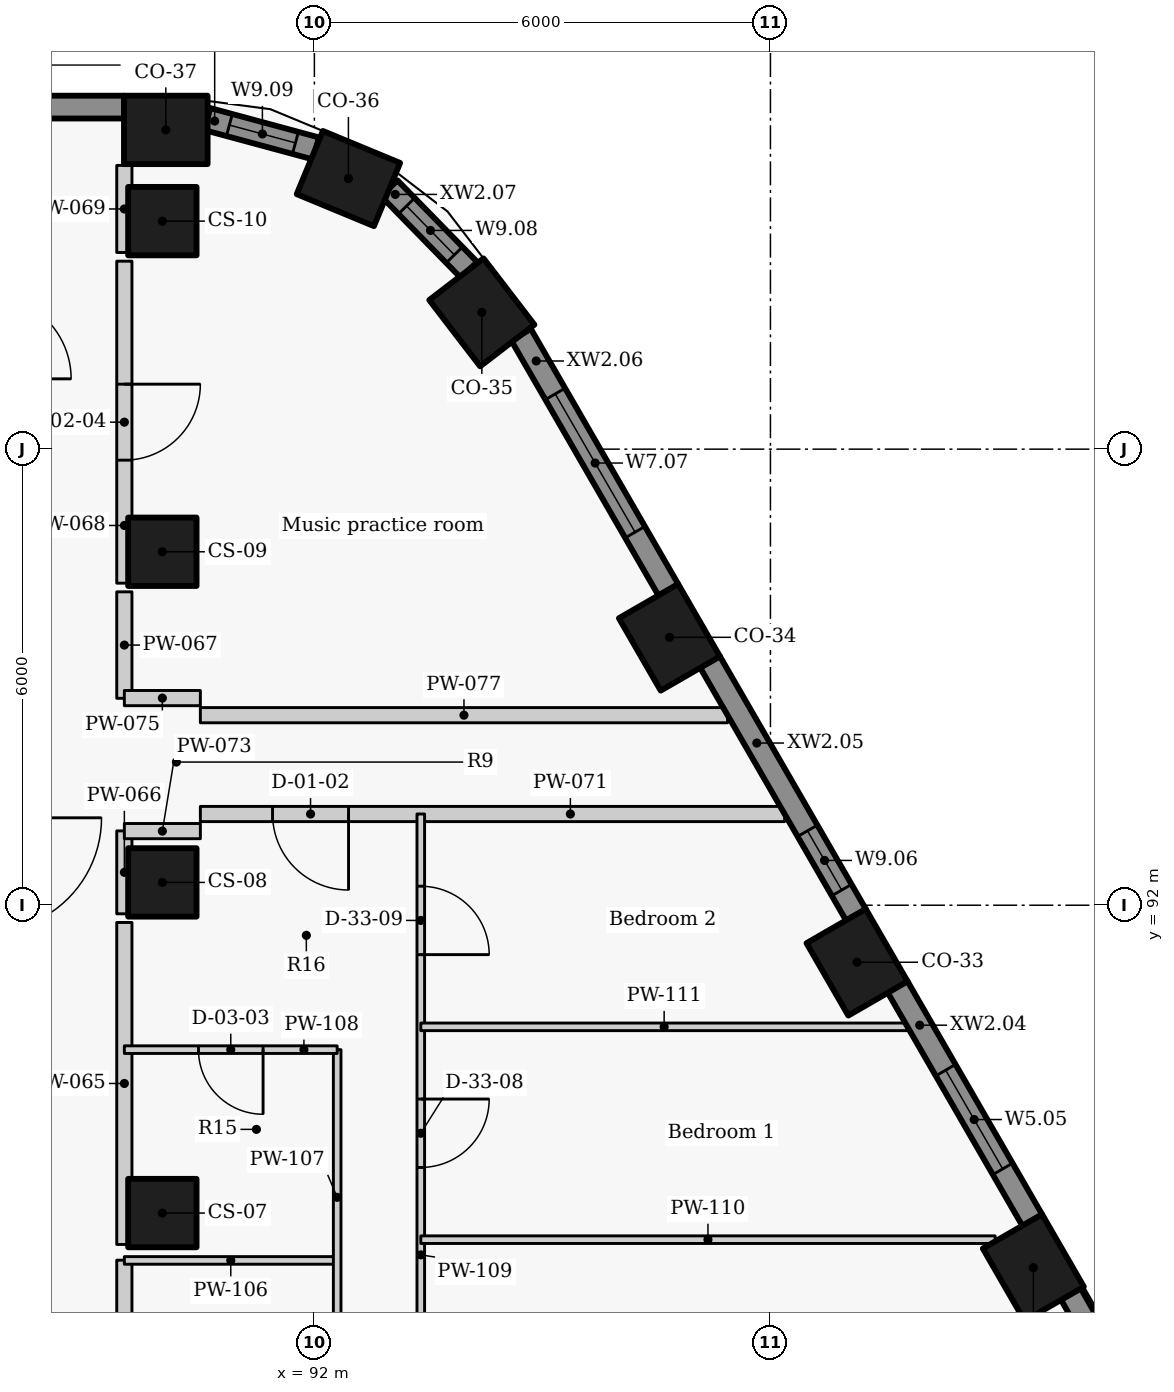
"""IFC4 building model, lengths in metres.
Left out: names, types, materials, properties, quantities, classifications, styles, units other than length and angle.
Written with IfcOpenShell. Run it as: python <this file> out.ifc"""

import sys

from ifc_helpers import new_model, si_unit, direction, frame, frame_2d, origin, origin_2d, place, context, subcontext, project, spatial, rectangle, extrude, element, fill, save


model = new_model("IFC4")
c1 = context("Model", 3, precision=1e-05, world=origin(), true_north=direction((0.0, 1.0)))
c2 = subcontext(c1, "Body", "Model", "MODEL_VIEW")
j1 = project(units=[si_unit("LENGTHUNIT", "METRE"), si_unit("PLANEANGLEUNIT", "RADIAN")], contexts=[c1])
p1 = place(None, origin())
s1 = spatial("IfcSite", under=j1, at=p1, CompositionType="ELEMENT")
p2 = place(p1, origin())
s2 = spatial("IfcBuilding", under=s1, at=p2, CompositionType="ELEMENT")
p3 = place(p2, frame((0.0, 0.0, 249.3)))
s3 = spatial("IfcBuildingStorey", under=s2, at=p3, CompositionType="ELEMENT", Elevation=249.3)
for number, where, z_axis, x_axis in (
    (1, (101.459, 87.232, 0.0), (0.0, 0.0, 1.0), (-0.5, 0.866, 0.0)),
    (2, (99.139, 91.25, 0.0), (0.0, 0.0, 1.0), (-0.5, 0.866, 0.0)),
    (3, (96.671, 95.525, 0.0), (0.0, 0.0, 1.0), (-0.5, 0.866, 0.0)),
    (4, (94.203, 99.8, 0.0), (0.0, 0.0, 1.0), (-0.609, 0.793, 0.0)),
    (5, (92.448, 101.56, 0.0), (0.0, 0.0, 1.0), (-0.924, 0.383, 0.0)),
    (6, (90.045, 102.2, 0.0), (0.0, 0.0, 1.0), (-1.0, 0.0, 0.0)),
):
    element("IfcColumn", number, at=place(p3, frame(where, z_axis=z_axis, x_axis=x_axis)), inside=s3, PredefinedType="COLUMN", context=c2, shape_type="SweptSolid", body=[
        extrude(rectangle(XDim=1.1, YDim=0.9, at=origin_2d()), origin(), (0.0, 0.0, 1.0), 3.3),
    ])
for number, where, z_axis, x_axis in (
    (7, (90.0, 87.95, 0.0), (0.0, 0.0, 1.0), (0.0, 1.0, 0.0)),
    (8, (90.0, 92.3, 0.0), (0.0, 0.0, 1.0), (0.0, 1.0, 0.0)),
    (9, (90.0, 96.65, 0.0), (0.0, 0.0, 1.0), (0.0, 1.0, 0.0)),
    (10, (90.0, 101.0, 0.0), (0.0, 0.0, 1.0), (0.0, 1.0, 0.0)),
):
    element("IfcColumn", number, at=place(p3, frame(where, z_axis=z_axis, x_axis=x_axis)), inside=s3, PredefinedType="COLUMN", context=c2, shape_type="SweptSolid", body=[
        extrude(rectangle(XDim=0.9, YDim=0.9, at=origin_2d()), origin(), (0.0, 0.0, 1.0), 3.3),
    ])
p4 = place(p3, frame((104.627, 82.154, 0.0), z_axis=(0.0, 0.0, 1.0), x_axis=(-0.492080931903, 0.870549456641, 0.0)))
e11 = element("IfcWall", 11, at=p4, inside=s3, PredefinedType="SOLIDWALL", context=c2, shape_type="SweptSolid", body=[
    extrude(rectangle(XDim=5.437, YDim=0.3, at=frame_2d((2.718, 0.0))), origin(), (0.0, 0.0, 1.0), 2.425),
])
p5 = place(p4, frame((0.934, 0.0, 0.9)))
e12 = element("IfcOpeningElement", 12, at=p5, cuts=e11, PredefinedType="OPENING", context=c2, shape_type="SweptSolid", body=[
    extrude(rectangle(XDim=0.9, YDim=1.1, at=frame_2d((0.45, 0.55))), frame((0.0, 0.16, 0.0), z_axis=(0.0, -1.0, 0.0), x_axis=(1.0, 0.0, 0.0)), (0.0, 0.0, 1.0), 0.32),
])
p6 = place(p4, frame((2.764, 0.0, 0.9)))
e13 = element("IfcOpeningElement", 13, at=p6, cuts=e11, PredefinedType="OPENING", context=c2, shape_type="SweptSolid", body=[
    extrude(rectangle(XDim=2.1, YDim=1.1, at=frame_2d((1.05, 0.55))), frame((0.0, 0.16, 0.0), z_axis=(0.0, -1.0, 0.0), x_axis=(1.0, 0.0, 0.0)), (0.0, 0.0, 1.0), 0.32),
])
p7 = place(p3, frame((101.446, 87.855, 0.0), z_axis=(0.0, 0.0, 1.0), x_axis=(-0.500010404316, 0.866019396766, 0.0)))
e14 = element("IfcWall", 14, at=p7, inside=s3, PredefinedType="SOLIDWALL", context=c2, shape_type="SweptSolid", body=[
    extrude(rectangle(XDim=3.547, YDim=0.3, at=frame_2d((1.774, 0.0))), origin(), (0.0, 0.0, 1.0), 2.425),
])
p8 = place(p7, frame((0.781, 0.0, 0.9)))
e15 = element("IfcOpeningElement", 15, at=p8, cuts=e14, PredefinedType="OPENING", context=c2, shape_type="SweptSolid", body=[
    extrude(rectangle(XDim=1.5, YDim=1.1, at=frame_2d((0.75, 0.55))), frame((0.0, 0.16, 0.0), z_axis=(0.0, -1.0, 0.0), x_axis=(1.0, 0.0, 0.0)), (0.0, 0.0, 1.0), 0.32),
])
p9 = place(p3, frame((99.126, 91.873, 0.0), z_axis=(0.0, 0.0, 1.0), x_axis=(-0.499984490703, 0.866034357896, 0.0)))
e16 = element("IfcWall", 16, at=p9, inside=s3, PredefinedType="SOLIDWALL", context=c2, shape_type="SweptSolid", body=[
    extrude(rectangle(XDim=3.844, YDim=0.3, at=frame_2d((1.922, 0.0))), origin(), (0.0, 0.0, 1.0), 2.425),
])
p10 = place(p9, frame((0.377, 0.0, 0.9)))
e17 = element("IfcOpeningElement", 17, at=p10, cuts=e16, PredefinedType="OPENING", context=c2, shape_type="SweptSolid", body=[
    extrude(rectangle(XDim=0.9, YDim=1.1, at=frame_2d((0.45, 0.55))), frame((0.0, 0.16, 0.0), z_axis=(0.0, -1.0, 0.0), x_axis=(1.0, 0.0, 0.0)), (0.0, 0.0, 1.0), 0.32),
])
p11 = place(p3, frame((96.658, 96.147, 0.0), z_axis=(0.0, 0.0, 1.0), x_axis=(-0.500011218404, 0.866018926739, 0.0)))
e18 = element("IfcWall", 18, at=p11, inside=s3, PredefinedType="SOLIDWALL", context=c2, shape_type="SweptSolid", body=[
    extrude(rectangle(XDim=3.879, YDim=0.3, at=frame_2d((1.939, 0.0))), origin(), (0.0, 0.0, 1.0), 2.425),
])
p12 = place(p11, frame((0.878, 0.0, 0.9)))
e19 = element("IfcOpeningElement", 19, at=p12, cuts=e18, PredefinedType="OPENING", context=c2, shape_type="SweptSolid", body=[
    extrude(rectangle(XDim=2.1, YDim=1.1, at=frame_2d((1.05, 0.55))), frame((0.0, 0.16, 0.0), z_axis=(0.0, -1.0, 0.0), x_axis=(1.0, 0.0, 0.0)), (0.0, 0.0, 1.0), 0.32),
])
p13 = place(p3, frame((94.034, 100.358, 0.0), z_axis=(0.0, 0.0, 1.0), x_axis=(-0.698675602211, 0.71543860874, 0.0)))
e20 = element("IfcWall", 20, at=p13, inside=s3, PredefinedType="SOLIDWALL", context=c2, shape_type="SweptSolid", body=[
    extrude(rectangle(XDim=1.5, YDim=0.3, at=frame_2d((0.75, 0.0))), origin(), (0.0, 0.0, 1.0), 2.425),
])
p14 = place(p13, frame((0.276, 0.0, 0.9)))
e21 = element("IfcOpeningElement", 21, at=p14, cuts=e20, PredefinedType="OPENING", context=c2, shape_type="SweptSolid", body=[
    extrude(rectangle(XDim=0.9, YDim=1.1, at=frame_2d((0.45, 0.55))), frame((0.0, 0.16, 0.0), z_axis=(0.0, -1.0, 0.0), x_axis=(1.0, 0.0, 0.0)), (0.0, 0.0, 1.0), 0.32),
])
p15 = place(p3, frame((92.021, 101.956, 0.0), z_axis=(0.0, 0.0, 1.0), x_axis=(-0.965392564919, 0.260801065181, 0.0)))
e22 = element("IfcWall", 22, at=p15, inside=s3, PredefinedType="SOLIDWALL", context=c2, shape_type="SweptSolid", body=[
    extrude(rectangle(XDim=1.481, YDim=0.3, at=frame_2d((0.74, 0.0))), origin(), (0.0, 0.0, 1.0), 2.425),
])
p16 = place(p15, frame((0.28, 0.0, 0.9)))
e23 = element("IfcOpeningElement", 23, at=p16, cuts=e22, PredefinedType="OPENING", context=c2, shape_type="SweptSolid", body=[
    extrude(rectangle(XDim=0.9, YDim=1.1, at=frame_2d((0.45, 0.55))), frame((0.0, 0.16, 0.0), z_axis=(0.0, -1.0, 0.0), x_axis=(1.0, 0.0, 0.0)), (0.0, 0.0, 1.0), 0.32),
])
p17 = place(p3, frame((89.499, 102.5, 0.0), z_axis=(0.0, 0.0, 1.0), x_axis=(-1.0, 0.0, 0.0)))
e24 = element("IfcWall", 24, at=p17, inside=s3, PredefinedType="SOLIDWALL", context=c2, shape_type="SweptSolid", body=[
    extrude(rectangle(XDim=19.033, YDim=0.3, at=frame_2d((9.517, 0.0))), origin(), (0.0, 0.0, 1.0), 2.425),
])
p18 = place(p3, frame((89.5, 82.237, 0.0), z_axis=(0.0, 0.0, 1.0), x_axis=(0.0, 1.0, 0.0)))
e25 = element("IfcWall", 25, at=p18, inside=s3, PredefinedType="PARTITIONING", context=c2, shape_type="SweptSolid", body=[
    extrude(rectangle(XDim=5.093, YDim=0.2, at=frame_2d((2.547, 0.0))), origin(), (0.0, 0.0, 1.0), 3.025),
])
p19 = place(p3, frame((89.5, 87.537, 0.0), z_axis=(0.0, 0.0, 1.0), x_axis=(0.0, 1.0, 0.0)))
e26 = element("IfcWall", 26, at=p19, inside=s3, PredefinedType="PARTITIONING", context=c2, shape_type="SweptSolid", body=[
    extrude(rectangle(XDim=4.236, YDim=0.2, at=frame_2d((2.118, 0.0))), origin(), (0.0, 0.0, 1.0), 3.025),
])
p20 = place(p3, frame((89.5, 91.887, 0.0), z_axis=(0.0, 0.0, 1.0), x_axis=(0.0, 1.0, 0.0)))
e27 = element("IfcWall", 27, at=p20, inside=s3, PredefinedType="PARTITIONING", context=c2, shape_type="SweptSolid", body=[
    extrude(rectangle(XDim=1.091, YDim=0.2, at=frame_2d((0.545, 0.0))), origin(), (0.0, 0.0, 1.0), 3.025),
])
p21 = place(p3, frame((89.5, 94.722, 0.0), z_axis=(0.0, 0.0, 1.0), x_axis=(0.0, 1.0, 0.0)))
e28 = element("IfcWall", 28, at=p21, inside=s3, PredefinedType="PARTITIONING", context=c2, shape_type="SweptSolid", body=[
    extrude(rectangle(XDim=1.401, YDim=0.2, at=frame_2d((0.701, 0.0))), origin(), (0.0, 0.0, 1.0), 3.025),
])
p22 = place(p3, frame((89.5, 100.473, 0.0), z_axis=(0.0, 0.0, 1.0), x_axis=(0.0, -1.0, 0.0)))
e29 = element("IfcWall", 29, at=p22, inside=s3, PredefinedType="PARTITIONING", context=c2, shape_type="SweptSolid", body=[
    extrude(rectangle(XDim=4.236, YDim=0.2, at=frame_2d((2.118, 0.0))), origin(), (0.0, 0.0, 1.0), 3.025),
])
p23 = place(p22, frame((1.618, 0.0, 0.0)))
e30 = element("IfcOpeningElement", 30, at=p23, cuts=e29, PredefinedType="OPENING", context=c2, shape_type="SweptSolid", body=[
    extrude(rectangle(XDim=1.0, YDim=2.1, at=frame_2d((0.5, 1.05))), frame((0.0, 0.11, 0.0), z_axis=(0.0, -1.0, 0.0), x_axis=(1.0, 0.0, 0.0)), (0.0, 0.0, 1.0), 0.22),
])
p24 = place(p3, frame((89.5, 100.587, 0.0), z_axis=(0.0, 0.0, 1.0), x_axis=(0.0, 1.0, 0.0)))
e31 = element("IfcWall", 31, at=p24, inside=s3, PredefinedType="PARTITIONING", context=c2, shape_type="SweptSolid", body=[
    extrude(rectangle(XDim=1.146, YDim=0.2, at=frame_2d((0.573, 0.0))), origin(), (0.0, 0.0, 1.0), 3.025),
])
p25 = place(p3, frame((98.187, 93.2, 0.0), z_axis=(0.0, 0.0, 1.0), x_axis=(-1.0, 0.0, 0.0)))
e32 = element("IfcWall", 32, at=p25, inside=s3, PredefinedType="PARTITIONING", context=c2, shape_type="SweptSolid", body=[
    extrude(rectangle(XDim=7.687, YDim=0.2, at=frame_2d((3.843, 0.0))), origin(), (0.0, 0.0, 1.0), 2.405),
])
p26 = place(p25, frame((5.737, 0.0, 0.0)))
e33 = element("IfcOpeningElement", 33, at=p26, cuts=e32, PredefinedType="OPENING", context=c2, shape_type="SweptSolid", body=[
    extrude(rectangle(XDim=1.0, YDim=2.1, at=frame_2d((0.5, 1.05))), frame((0.0, 0.11, 0.0), z_axis=(0.0, -1.0, 0.0), x_axis=(1.0, 0.0, 0.0)), (0.0, 0.0, 1.0), 0.22),
])
for number, where, z_axis, x_axis in (
    (34, (89.5, 92.975, 0.0), (0.0, 0.0, 1.0), (1.0, 0.0, 0.0)),
    (35, (89.5, 94.725, 0.0), (0.0, 0.0, 1.0), (1.0, 0.0, 0.0)),
):
    element("IfcWall", number, at=place(p3, frame(where, z_axis=z_axis, x_axis=x_axis)), inside=s3, PredefinedType="PARTITIONING", context=c2, shape_type="SweptSolid", body=[
        extrude(rectangle(XDim=1.0, YDim=0.2, at=frame_2d((0.5, 0.0))), origin(), (0.0, 0.0, 1.0), 2.505),
    ])
p27 = place(p3, frame((90.5, 94.5, 0.0), z_axis=(0.0, 0.0, 1.0), x_axis=(1.0, 0.0, 0.0)))
e36 = element("IfcWall", 36, at=p27, inside=s3, PredefinedType="PARTITIONING", context=c2, shape_type="SweptSolid", body=[
    extrude(rectangle(XDim=6.936, YDim=0.2, at=frame_2d((3.468, 0.0))), origin(), (0.0, 0.0, 1.0), 2.405),
])
p28 = place(p3, frame((89.5, 87.327, 0.0), z_axis=(0.0, 0.0, 1.0), x_axis=(1.0, 0.0, 0.0)))
e37 = element("IfcWall", 37, at=p28, inside=s3, PredefinedType="PARTITIONING", context=c2, shape_type="SweptSolid", body=[
    extrude(rectangle(XDim=2.8, YDim=0.1, at=frame_2d((1.4, 0.0))), origin(), (0.0, 0.0, 1.0), 2.505),
])
p29 = place(p3, frame((92.3, 84.0, 0.0), z_axis=(0.0, 0.0, 1.0), x_axis=(0.0, 1.0, 0.0)))
e38 = element("IfcWall", 38, at=p29, inside=s3, PredefinedType="PARTITIONING", context=c2, shape_type="SweptSolid", body=[
    extrude(rectangle(XDim=6.1, YDim=0.1, at=frame_2d((3.05, 0.0))), origin(), (0.0, 0.0, 1.0), 3.025),
])
p30 = place(p29, frame((1.214, 0.0, 0.0)))
e39 = element("IfcOpeningElement", 39, at=p30, cuts=e38, PredefinedType="OPENING", context=c2, shape_type="SweptSolid", body=[
    extrude(rectangle(XDim=0.9, YDim=2.1, at=frame_2d((0.45, 1.05))), frame((0.0, 0.06, 0.0), z_axis=(0.0, -1.0, 0.0), x_axis=(1.0, 0.0, 0.0)), (0.0, 0.0, 1.0), 0.12),
])
p31 = place(p3, frame((92.3, 90.1, 0.0), z_axis=(0.0, 0.0, 1.0), x_axis=(-1.0, 0.0, 0.0)))
e40 = element("IfcWall", 40, at=p31, inside=s3, PredefinedType="PARTITIONING", context=c2, shape_type="SweptSolid", body=[
    extrude(rectangle(XDim=2.8, YDim=0.1, at=frame_2d((1.4, 0.0))), origin(), (0.0, 0.0, 1.0), 2.505),
])
p32 = place(p31, frame((0.975, 0.0, 0.0)))
e41 = element("IfcOpeningElement", 41, at=p32, cuts=e40, PredefinedType="OPENING", context=c2, shape_type="SweptSolid", body=[
    extrude(rectangle(XDim=0.85, YDim=2.1, at=frame_2d((0.425, 1.05))), frame((0.0, 0.06, 0.0), z_axis=(0.0, -1.0, 0.0), x_axis=(1.0, 0.0, 0.0)), (0.0, 0.0, 1.0), 0.12),
])
p33 = place(p3, frame((93.4, 93.2, 0.0), z_axis=(0.0, 0.0, 1.0), x_axis=(0.0, -1.0, 0.0)))
e42 = element("IfcWall", 42, at=p33, inside=s3, PredefinedType="PARTITIONING", context=c2, shape_type="SweptSolid", body=[
    extrude(rectangle(XDim=9.2, YDim=0.1, at=frame_2d((4.6, 0.0))), origin(), (0.0, 0.0, 1.0), 3.025),
])
p34 = place(p33, frame((6.95, 0.0, 0.0)))
e43 = element("IfcOpeningElement", 43, at=p34, cuts=e42, PredefinedType="OPENING", context=c2, shape_type="SweptSolid", body=[
    extrude(rectangle(XDim=0.9, YDim=2.1, at=frame_2d((0.45, 1.05))), frame((0.0, 0.06, 0.0), z_axis=(0.0, -1.0, 0.0), x_axis=(1.0, 0.0, 0.0)), (0.0, 0.0, 1.0), 0.12),
])
p35 = place(p33, frame((3.75, 0.0, 0.0)))
e44 = element("IfcOpeningElement", 44, at=p35, cuts=e42, PredefinedType="OPENING", context=c2, shape_type="SweptSolid", body=[
    extrude(rectangle(XDim=0.9, YDim=2.1, at=frame_2d((0.45, 1.05))), frame((0.0, 0.06, 0.0), z_axis=(0.0, -1.0, 0.0), x_axis=(1.0, 0.0, 0.0)), (0.0, 0.0, 1.0), 0.12),
])
p36 = place(p33, frame((0.95, 0.0, 0.0)))
e45 = element("IfcOpeningElement", 45, at=p36, cuts=e42, PredefinedType="OPENING", context=c2, shape_type="SweptSolid", body=[
    extrude(rectangle(XDim=0.9, YDim=2.1, at=frame_2d((0.45, 1.05))), frame((0.0, 0.06, 0.0), z_axis=(0.0, -1.0, 0.0), x_axis=(1.0, 0.0, 0.0)), (0.0, 0.0, 1.0), 0.12),
])
p37 = place(p3, frame((93.4, 87.6, 0.0), z_axis=(0.0, 0.0, 1.0), x_axis=(1.0, 0.0, 0.0)))
e46 = element("IfcWall", 46, at=p37, inside=s3, PredefinedType="PARTITIONING", context=c2, shape_type="SweptSolid", body=[
    extrude(rectangle(XDim=7.556, YDim=0.1, at=frame_2d((3.778, 0.0))), origin(), (0.0, 0.0, 1.0), 3.025),
])
p38 = place(p3, frame((93.4, 90.4, 0.0), z_axis=(0.0, 0.0, 1.0), x_axis=(1.0, 0.0, 0.0)))
e47 = element("IfcWall", 47, at=p38, inside=s3, PredefinedType="PARTITIONING", context=c2, shape_type="SweptSolid", body=[
    extrude(rectangle(XDim=6.403, YDim=0.1, at=frame_2d((3.202, 0.0))), origin(), (0.0, 0.0, 1.0), 2.405),
])
p39 = place(p8, origin())
e48 = element("IfcWindow", 48, at=p39, inside=s3, PartitioningType="SINGLE_PANEL", PredefinedType="WINDOW", context=c2, shape_type="SweptSolid", body=[
    extrude(rectangle(XDim=1.5, YDim=1.1, at=frame_2d((0.75, 0.55))), frame((0.0, 0.03, 0.0), z_axis=(0.0, -1.0, 0.0), x_axis=(1.0, 0.0, 0.0)), (0.0, 0.0, 1.0), 0.06),
])
fill(e15, e48)
p40 = place(p10, origin())
e49 = element("IfcWindow", 49, at=p40, inside=s3, PartitioningType="SINGLE_PANEL", PredefinedType="WINDOW", context=c2, shape_type="SweptSolid", body=[
    extrude(rectangle(XDim=0.9, YDim=1.1, at=frame_2d((0.45, 0.55))), frame((0.0, 0.03, 0.0), z_axis=(0.0, -1.0, 0.0), x_axis=(1.0, 0.0, 0.0)), (0.0, 0.0, 1.0), 0.06),
])
fill(e17, e49)
p41 = place(p12, origin())
e50 = element("IfcWindow", 50, at=p41, inside=s3, PartitioningType="SINGLE_PANEL", PredefinedType="WINDOW", context=c2, shape_type="SweptSolid", body=[
    extrude(rectangle(XDim=2.1, YDim=1.1, at=frame_2d((1.05, 0.55))), frame((0.0, 0.03, 0.0), z_axis=(0.0, -1.0, 0.0), x_axis=(1.0, 0.0, 0.0)), (0.0, 0.0, 1.0), 0.06),
])
fill(e19, e50)
p42 = place(p14, origin())
e51 = element("IfcWindow", 51, at=p42, inside=s3, PartitioningType="SINGLE_PANEL", PredefinedType="WINDOW", context=c2, shape_type="SweptSolid", body=[
    extrude(rectangle(XDim=0.9, YDim=1.1, at=frame_2d((0.45, 0.55))), frame((0.0, 0.03, 0.0), z_axis=(0.0, -1.0, 0.0), x_axis=(1.0, 0.0, 0.0)), (0.0, 0.0, 1.0), 0.06),
])
fill(e21, e51)
p43 = place(p16, origin())
e52 = element("IfcWindow", 52, at=p43, inside=s3, PartitioningType="SINGLE_PANEL", PredefinedType="WINDOW", context=c2, shape_type="SweptSolid", body=[
    extrude(rectangle(XDim=0.9, YDim=1.1, at=frame_2d((0.45, 0.55))), frame((0.0, 0.03, 0.0), z_axis=(0.0, -1.0, 0.0), x_axis=(1.0, 0.0, 0.0)), (0.0, 0.0, 1.0), 0.06),
])
fill(e23, e52)
p44 = place(p26, origin())
e53 = element("IfcDoor", 53, at=p44, inside=s3, OperationType="SINGLE_SWING_LEFT", PredefinedType="DOOR", context=c2, shape_type="SweptSolid", body=[
    extrude(rectangle(XDim=1.0, YDim=2.1, at=frame_2d((0.5, 1.05))), frame((0.0, 0.025, 0.0), z_axis=(0.0, -1.0, 0.0), x_axis=(1.0, 0.0, 0.0)), (0.0, 0.0, 1.0), 0.05),
])
fill(e33, e53)
p45 = place(p32, origin())
e54 = element("IfcDoor", 54, at=p45, inside=s3, OperationType="SINGLE_SWING_LEFT", PredefinedType="DOOR", context=c2, shape_type="SweptSolid", body=[
    extrude(rectangle(XDim=0.85, YDim=2.1, at=frame_2d((0.425, 1.05))), frame((0.0, 0.025, 0.0), z_axis=(0.0, -1.0, 0.0), x_axis=(1.0, 0.0, 0.0)), (0.0, 0.0, 1.0), 0.05),
])
fill(e41, e54)
p46 = place(p35, origin())
e55 = element("IfcDoor", 55, at=p46, inside=s3, OperationType="SINGLE_SWING_LEFT", PredefinedType="DOOR", context=c2, shape_type="SweptSolid", body=[
    extrude(rectangle(XDim=0.9, YDim=2.1, at=frame_2d((0.45, 1.05))), frame((0.0, 0.025, 0.0), z_axis=(0.0, -1.0, 0.0), x_axis=(1.0, 0.0, 0.0)), (0.0, 0.0, 1.0), 0.05),
])
fill(e44, e55)
p47 = place(p36, origin())
e56 = element("IfcDoor", 56, at=p47, inside=s3, OperationType="SINGLE_SWING_RIGHT", PredefinedType="DOOR", context=c2, shape_type="SweptSolid", body=[
    extrude(rectangle(XDim=0.9, YDim=2.1, at=frame_2d((0.45, 1.05))), frame((0.0, 0.025, 0.0), z_axis=(0.0, -1.0, 0.0), x_axis=(1.0, 0.0, 0.0)), (0.0, 0.0, 1.0), 0.05),
])
fill(e45, e56)
p48 = place(p23, origin())
e57 = element("IfcDoor", 57, at=p48, inside=s3, OperationType="SINGLE_SWING_LEFT", PredefinedType="DOOR", context=c2, shape_type="SweptSolid", body=[
    extrude(rectangle(XDim=1.0, YDim=2.1, at=frame_2d((0.5, 1.05))), frame((0.0, 0.025, 0.0), z_axis=(0.0, -1.0, 0.0), x_axis=(1.0, 0.0, 0.0)), (0.0, 0.0, 1.0), 0.05),
])
fill(e30, e57)
save(model, sys.argv[1])
